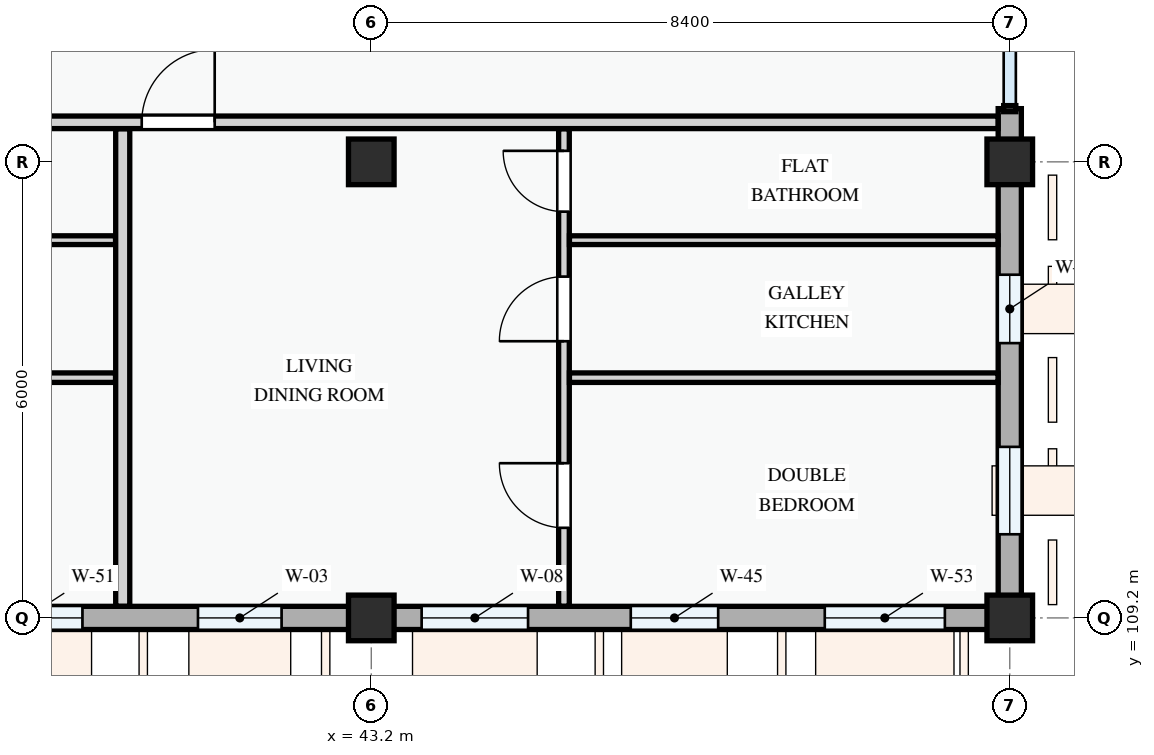
"""IFC4 building model, lengths in metres.
Left out: names, types, materials, properties, quantities, classifications, styles, units other than length and angle.
Written with IfcOpenShell. Run it as: python <this file> out.ifc"""

import sys

from ifc_helpers import new_model, si_unit, direction, frame, frame_2d, origin, origin_2d, place, context, subcontext, project, spatial, rectangle, extrude, element, fill, save


model = new_model("IFC4")
c1 = context("Model", 3, precision=1e-05, world=origin(), true_north=direction((0.0, 1.0)))
c2 = subcontext(c1, "Body", "Model", "MODEL_VIEW")
j1 = project(units=[si_unit("LENGTHUNIT", "METRE"), si_unit("PLANEANGLEUNIT", "RADIAN")], contexts=[c1])
p1 = place(None, origin())
s1 = spatial("IfcSite", under=j1, at=p1, CompositionType="ELEMENT")
p2 = place(p1, origin())
s2 = spatial("IfcBuilding", under=s1, at=p2, CompositionType="ELEMENT")
p3 = place(p2, frame((0.0, 0.0, 24.6)))
s3 = spatial("IfcBuildingStorey", under=s2, at=p3, CompositionType="ELEMENT", Elevation=24.6)
for number, where, z_axis, x_axis in (
    (1, (43.2, 109.2, 0.0), (0.0, 0.0, 1.0), (1.0, 0.0, 0.0)),
    (2, (43.2, 115.2, 0.0), (0.0, 0.0, 1.0), (1.0, 0.0, 0.0)),
    (3, (51.6, 109.2, 0.0), (0.0, 0.0, 1.0), (1.0, 0.0, 0.0)),
    (4, (51.6, 115.2, 0.0), (0.0, 0.0, 1.0), (1.0, 0.0, 0.0)),
):
    element("IfcColumn", number, at=place(p3, frame(where, z_axis=z_axis, x_axis=x_axis)), inside=s3, PredefinedType="COLUMN", context=c2, shape_type="SweptSolid", body=[
        extrude(rectangle(XDim=0.6, YDim=0.6, at=origin_2d()), origin(), (0.0, 0.0, 1.0), 3.3),
    ])
p4 = place(p3, frame((37.2, 109.2, 0.0), z_axis=(0.0, 0.0, 1.0), x_axis=(1.0, 0.0, 0.0)))
e5 = element("IfcWall", 5, at=p4, inside=s3, PredefinedType="STANDARD", context=c2, shape_type="SweptSolid", body=[
    extrude(rectangle(XDim=6.0, YDim=0.305, at=frame_2d((3.0, 0.0))), origin(), (0.0, 0.0, 1.0), 2.475),
])
p5 = place(p4, frame((0.72, 0.0, 0.78)))
e6 = element("IfcOpeningElement", 6, at=p5, cuts=e5, PredefinedType="OPENING", context=c2, shape_type="SweptSolid", body=[
    extrude(rectangle(XDim=1.48, YDim=1.52, at=frame_2d((0.74, 0.76))), frame((0.0, 0.163, 0.0), z_axis=(0.0, -1.0, 0.0), x_axis=(1.0, 0.0, 0.0)), (0.0, 0.0, 1.0), 0.325),
])
p6 = place(p4, frame((3.72, 0.0, 0.78)))
e7 = element("IfcOpeningElement", 7, at=p6, cuts=e5, PredefinedType="OPENING", context=c2, shape_type="SweptSolid", body=[
    extrude(rectangle(XDim=1.1, YDim=1.3, at=frame_2d((0.55, 0.65))), frame((0.0, 0.163, 0.0), z_axis=(0.0, -1.0, 0.0), x_axis=(1.0, 0.0, 0.0)), (0.0, 0.0, 1.0), 0.325),
])
p7 = place(p3, frame((43.2, 109.2, 0.0), z_axis=(0.0, 0.0, 1.0), x_axis=(1.0, 0.0, 0.0)))
e8 = element("IfcWall", 8, at=p7, inside=s3, PredefinedType="STANDARD", context=c2, shape_type="SweptSolid", body=[
    extrude(rectangle(XDim=8.4, YDim=0.305, at=frame_2d((4.2, 0.0))), origin(), (0.0, 0.0, 1.0), 2.375),
])
p8 = place(p7, frame((0.663, 0.0, 0.78)))
e9 = element("IfcOpeningElement", 9, at=p8, cuts=e8, PredefinedType="OPENING", context=c2, shape_type="SweptSolid", body=[
    extrude(rectangle(XDim=1.4, YDim=1.45, at=frame_2d((0.7, 0.725))), frame((0.0, 0.163, 0.0), z_axis=(0.0, -1.0, 0.0), x_axis=(1.0, 0.0, 0.0)), (0.0, 0.0, 1.0), 0.325),
])
p9 = place(p7, frame((3.414, 0.0, 0.78)))
e10 = element("IfcOpeningElement", 10, at=p9, cuts=e8, PredefinedType="OPENING", context=c2, shape_type="SweptSolid", body=[
    extrude(rectangle(XDim=1.15, YDim=1.25, at=frame_2d((0.575, 0.625))), frame((0.0, 0.163, 0.0), z_axis=(0.0, -1.0, 0.0), x_axis=(1.0, 0.0, 0.0)), (0.0, 0.0, 1.0), 0.325),
])
p10 = place(p7, frame((5.966, 0.0, 0.78)))
e11 = element("IfcOpeningElement", 11, at=p10, cuts=e8, PredefinedType="OPENING", context=c2, shape_type="SweptSolid", body=[
    extrude(rectangle(XDim=1.58, YDim=1.48, at=frame_2d((0.79, 0.74))), frame((0.0, 0.163, 0.0), z_axis=(0.0, -1.0, 0.0), x_axis=(1.0, 0.0, 0.0)), (0.0, 0.0, 1.0), 0.325),
])
p11 = place(p3, frame((51.6, 109.2, 0.0), z_axis=(0.0, 0.0, 1.0), x_axis=(0.0, 1.0, 0.0)))
e12 = element("IfcWall", 12, at=p11, inside=s3, PredefinedType="STANDARD", context=c2, shape_type="SweptSolid", body=[
    extrude(rectangle(XDim=6.0, YDim=0.305, at=frame_2d((3.0, 0.0))), origin(), (0.0, 0.0, 1.0), 2.575),
])
p12 = place(p11, frame((1.1, 0.0, 0.78)))
e13 = element("IfcOpeningElement", 13, at=p12, cuts=e12, PredefinedType="OPENING", context=c2, shape_type="SweptSolid", body=[
    extrude(rectangle(XDim=1.15, YDim=1.25, at=frame_2d((0.575, 0.625))), frame((0.0, 0.163, 0.0), z_axis=(0.0, -1.0, 0.0), x_axis=(1.0, 0.0, 0.0)), (0.0, 0.0, 1.0), 0.325),
])
p13 = place(p11, frame((3.615, 0.0, 0.78)))
e14 = element("IfcOpeningElement", 14, at=p13, cuts=e12, PredefinedType="OPENING", context=c2, shape_type="SweptSolid", body=[
    extrude(rectangle(XDim=0.9, YDim=1.2, at=frame_2d((0.45, 0.6))), frame((0.0, 0.163, 0.0), z_axis=(0.0, -1.0, 0.0), x_axis=(1.0, 0.0, 0.0)), (0.0, 0.0, 1.0), 0.325),
])
p14 = place(p3, frame((51.6, 115.2, 0.0), z_axis=(0.0, 0.0, 1.0), x_axis=(0.0, 1.0, 0.0)))
e15 = element("IfcWall", 15, at=p14, inside=s3, PredefinedType="STANDARD", context=c2, shape_type="SweptSolid", body=[
    extrude(rectangle(XDim=0.7, YDim=0.305, at=frame_2d((0.35, 0.0))), origin(), (0.0, 0.0, 1.0), 2.425),
])
p15 = place(p3, frame((35.507, 112.361, 0.0), z_axis=(0.0, 0.0, 1.0), x_axis=(1.0, 0.0, 0.0)))
e16 = element("IfcWall", 16, at=p15, inside=s3, PredefinedType="PARTITIONING", context=c2, shape_type="SweptSolid", body=[
    extrude(rectangle(XDim=4.328, YDim=0.125, at=frame_2d((2.164, 0.0))), origin(), (0.0, 0.0, 1.0), 3.0),
])
p16 = place(p3, frame((35.507, 114.17, 0.0), z_axis=(0.0, 0.0, 1.0), x_axis=(1.0, 0.0, 0.0)))
e17 = element("IfcWall", 17, at=p16, inside=s3, PredefinedType="PARTITIONING", context=c2, shape_type="SweptSolid", body=[
    extrude(rectangle(XDim=4.328, YDim=0.115, at=frame_2d((2.164, 0.0))), origin(), (0.0, 0.0, 1.0), 3.0),
])
p17 = place(p3, frame((45.735, 109.354, 0.0), z_axis=(0.0, 0.0, 1.0), x_axis=(0.0, 1.0, 0.0)))
e18 = element("IfcWall", 18, at=p17, inside=s3, PredefinedType="PARTITIONING", context=c2, shape_type="SweptSolid", body=[
    extrude(rectangle(XDim=6.281, YDim=0.14, at=frame_2d((3.141, 0.0))), origin(), (0.0, 0.0, 1.0), 3.0),
])
p18 = place(p17, frame((1.031, 0.0, 0.0)))
e19 = element("IfcOpeningElement", 19, at=p18, cuts=e18, PredefinedType="OPENING", context=c2, shape_type="SweptSolid", body=[
    extrude(rectangle(XDim=0.85, YDim=2.1, at=frame_2d((0.425, 1.05))), frame((0.0, 0.08, 0.0), z_axis=(0.0, -1.0, 0.0), x_axis=(1.0, 0.0, 0.0)), (0.0, 0.0, 1.0), 0.16),
])
p19 = place(p17, frame((3.486, 0.0, 0.0)))
e20 = element("IfcOpeningElement", 20, at=p19, cuts=e18, PredefinedType="OPENING", context=c2, shape_type="SweptSolid", body=[
    extrude(rectangle(XDim=0.85, YDim=2.1, at=frame_2d((0.425, 1.05))), frame((0.0, 0.08, 0.0), z_axis=(0.0, -1.0, 0.0), x_axis=(1.0, 0.0, 0.0)), (0.0, 0.0, 1.0), 0.16),
])
p20 = place(p17, frame((5.19, 0.0, 0.0)))
e21 = element("IfcOpeningElement", 21, at=p20, cuts=e18, PredefinedType="OPENING", context=c2, shape_type="SweptSolid", body=[
    extrude(rectangle(XDim=0.8, YDim=2.1, at=frame_2d((0.4, 1.05))), frame((0.0, 0.08, 0.0), z_axis=(0.0, -1.0, 0.0), x_axis=(1.0, 0.0, 0.0)), (0.0, 0.0, 1.0), 0.16),
])
p21 = place(p3, frame((45.807, 112.361, 0.0), z_axis=(0.0, 0.0, 1.0), x_axis=(1.0, 0.0, 0.0)))
e22 = element("IfcWall", 22, at=p21, inside=s3, PredefinedType="PARTITIONING", context=c2, shape_type="SweptSolid", body=[
    extrude(rectangle(XDim=5.639, YDim=0.125, at=frame_2d((2.819, 0.0))), origin(), (0.0, 0.0, 1.0), 3.0),
])
p22 = place(p3, frame((45.807, 114.17, 0.0), z_axis=(0.0, 0.0, 1.0), x_axis=(1.0, 0.0, 0.0)))
e23 = element("IfcWall", 23, at=p22, inside=s3, PredefinedType="PARTITIONING", context=c2, shape_type="SweptSolid", body=[
    extrude(rectangle(XDim=5.639, YDim=0.115, at=frame_2d((2.819, 0.0))), origin(), (0.0, 0.0, 1.0), 3.0),
])
p23 = place(p3, frame((39.93, 109.354, 0.0), z_axis=(0.0, 0.0, 1.0), x_axis=(0.0, 1.0, 0.0)))
e24 = element("IfcWall", 24, at=p23, inside=s3, PredefinedType="PARTITIONING", context=c2, shape_type="SweptSolid", body=[
    extrude(rectangle(XDim=6.281, YDim=0.185, at=frame_2d((3.141, 0.0))), origin(), (0.0, 0.0, 1.0), 3.0),
])
p24 = place(p3, frame((25.15, 115.72, 0.0), z_axis=(0.0, 0.0, 1.0), x_axis=(1.0, 0.0, 0.0)))
e25 = element("IfcWall", 25, at=p24, inside=s3, PredefinedType="PARTITIONING", context=c2, shape_type="SweptSolid", body=[
    extrude(rectangle(XDim=26.296, YDim=0.165, at=frame_2d((13.148, 0.0))), origin(), (0.0, 0.0, 1.0), 3.0),
])
p25 = place(p24, frame((0.25, 0.0, 0.0)))
e26 = element("IfcOpeningElement", 26, at=p25, cuts=e25, PredefinedType="OPENING", context=c2, shape_type="SweptSolid", body=[
    extrude(rectangle(XDim=0.92, YDim=2.1, at=frame_2d((0.46, 1.05))), frame((0.0, 0.093, 0.0), z_axis=(0.0, -1.0, 0.0), x_axis=(1.0, 0.0, 0.0)), (0.0, 0.0, 1.0), 0.185),
])
p26 = place(p24, frame((7.64, 0.0, 0.0)))
e27 = element("IfcOpeningElement", 27, at=p26, cuts=e25, PredefinedType="OPENING", context=c2, shape_type="SweptSolid", body=[
    extrude(rectangle(XDim=0.92, YDim=2.1, at=frame_2d((0.46, 1.05))), frame((0.0, 0.093, 0.0), z_axis=(0.0, -1.0, 0.0), x_axis=(1.0, 0.0, 0.0)), (0.0, 0.0, 1.0), 0.185),
])
p27 = place(p24, frame((15.03, 0.0, 0.0)))
e28 = element("IfcOpeningElement", 28, at=p27, cuts=e25, PredefinedType="OPENING", context=c2, shape_type="SweptSolid", body=[
    extrude(rectangle(XDim=0.96, YDim=2.12, at=frame_2d((0.48, 1.06))), frame((0.0, 0.093, 0.0), z_axis=(0.0, -1.0, 0.0), x_axis=(1.0, 0.0, 0.0)), (0.0, 0.0, 1.0), 0.185),
])
p28 = place(p5, origin())
e29 = element("IfcWindow", 29, at=p28, inside=s3, PartitioningType="SINGLE_PANEL", PredefinedType="WINDOW", context=c2, shape_type="SweptSolid", body=[
    extrude(rectangle(XDim=1.48, YDim=1.52, at=frame_2d((0.74, 0.76))), frame((0.0, 0.03, 0.0), z_axis=(0.0, -1.0, 0.0), x_axis=(1.0, 0.0, 0.0)), (0.0, 0.0, 1.0), 0.06),
])
fill(e6, e29)
p29 = place(p6, origin())
e30 = element("IfcWindow", 30, at=p29, inside=s3, PartitioningType="SINGLE_PANEL", PredefinedType="WINDOW", context=c2, shape_type="SweptSolid", body=[
    extrude(rectangle(XDim=1.1, YDim=1.3, at=frame_2d((0.55, 0.65))), frame((0.0, 0.03, 0.0), z_axis=(0.0, -1.0, 0.0), x_axis=(1.0, 0.0, 0.0)), (0.0, 0.0, 1.0), 0.06),
])
fill(e7, e30)
p30 = place(p8, origin())
e31 = element("IfcWindow", 31, at=p30, inside=s3, PartitioningType="SINGLE_PANEL", PredefinedType="WINDOW", context=c2, shape_type="SweptSolid", body=[
    extrude(rectangle(XDim=1.4, YDim=1.45, at=frame_2d((0.7, 0.725))), frame((0.0, 0.03, 0.0), z_axis=(0.0, -1.0, 0.0), x_axis=(1.0, 0.0, 0.0)), (0.0, 0.0, 1.0), 0.06),
])
fill(e9, e31)
p31 = place(p9, origin())
e32 = element("IfcWindow", 32, at=p31, inside=s3, PartitioningType="SINGLE_PANEL", PredefinedType="WINDOW", context=c2, shape_type="SweptSolid", body=[
    extrude(rectangle(XDim=1.15, YDim=1.25, at=frame_2d((0.575, 0.625))), frame((0.0, 0.03, 0.0), z_axis=(0.0, -1.0, 0.0), x_axis=(1.0, 0.0, 0.0)), (0.0, 0.0, 1.0), 0.06),
])
fill(e10, e32)
p32 = place(p10, origin())
e33 = element("IfcWindow", 33, at=p32, inside=s3, PartitioningType="SINGLE_PANEL", PredefinedType="WINDOW", context=c2, shape_type="SweptSolid", body=[
    extrude(rectangle(XDim=1.58, YDim=1.48, at=frame_2d((0.79, 0.74))), frame((0.0, 0.03, 0.0), z_axis=(0.0, -1.0, 0.0), x_axis=(1.0, 0.0, 0.0)), (0.0, 0.0, 1.0), 0.06),
])
fill(e11, e33)
p33 = place(p12, origin())
e34 = element("IfcWindow", 34, at=p33, inside=s3, PartitioningType="SINGLE_PANEL", PredefinedType="WINDOW", context=c2, shape_type="SweptSolid", body=[
    extrude(rectangle(XDim=1.15, YDim=1.25, at=frame_2d((0.575, 0.625))), frame((0.0, 0.03, 0.0), z_axis=(0.0, -1.0, 0.0), x_axis=(1.0, 0.0, 0.0)), (0.0, 0.0, 1.0), 0.06),
])
fill(e13, e34)
p34 = place(p13, origin())
e35 = element("IfcWindow", 35, at=p34, inside=s3, PartitioningType="SINGLE_PANEL", PredefinedType="WINDOW", context=c2, shape_type="SweptSolid", body=[
    extrude(rectangle(XDim=0.9, YDim=1.2, at=frame_2d((0.45, 0.6))), frame((0.0, 0.03, 0.0), z_axis=(0.0, -1.0, 0.0), x_axis=(1.0, 0.0, 0.0)), (0.0, 0.0, 1.0), 0.06),
])
fill(e14, e35)
p35 = place(p18, origin())
e36 = element("IfcDoor", 36, at=p35, inside=s3, OperationType="SINGLE_SWING_RIGHT", PredefinedType="DOOR", context=c2, shape_type="SweptSolid", body=[
    extrude(rectangle(XDim=0.85, YDim=2.1, at=frame_2d((0.425, 1.05))), frame((0.0, 0.025, 0.0), z_axis=(0.0, -1.0, 0.0), x_axis=(1.0, 0.0, 0.0)), (0.0, 0.0, 1.0), 0.05),
])
fill(e19, e36)
p36 = place(p19, origin())
e37 = element("IfcDoor", 37, at=p36, inside=s3, OperationType="SINGLE_SWING_LEFT", PredefinedType="DOOR", context=c2, shape_type="SweptSolid", body=[
    extrude(rectangle(XDim=0.85, YDim=2.1, at=frame_2d((0.425, 1.05))), frame((0.0, 0.025, 0.0), z_axis=(0.0, -1.0, 0.0), x_axis=(1.0, 0.0, 0.0)), (0.0, 0.0, 1.0), 0.05),
])
fill(e20, e37)
p37 = place(p20, origin())
e38 = element("IfcDoor", 38, at=p37, inside=s3, OperationType="SINGLE_SWING_RIGHT", PredefinedType="DOOR", context=c2, shape_type="SweptSolid", body=[
    extrude(rectangle(XDim=0.8, YDim=2.1, at=frame_2d((0.4, 1.05))), frame((0.0, 0.025, 0.0), z_axis=(0.0, -1.0, 0.0), x_axis=(1.0, 0.0, 0.0)), (0.0, 0.0, 1.0), 0.05),
])
fill(e21, e38)
p38 = place(p27, origin())
e39 = element("IfcDoor", 39, at=p38, inside=s3, OperationType="SINGLE_SWING_RIGHT", PredefinedType="DOOR", context=c2, shape_type="SweptSolid", body=[
    extrude(rectangle(XDim=0.96, YDim=2.12, at=frame_2d((0.48, 1.06))), frame((0.0, 0.025, 0.0), z_axis=(0.0, -1.0, 0.0), x_axis=(1.0, 0.0, 0.0)), (0.0, 0.0, 1.0), 0.05),
])
fill(e28, e39)
save(model, sys.argv[1])
